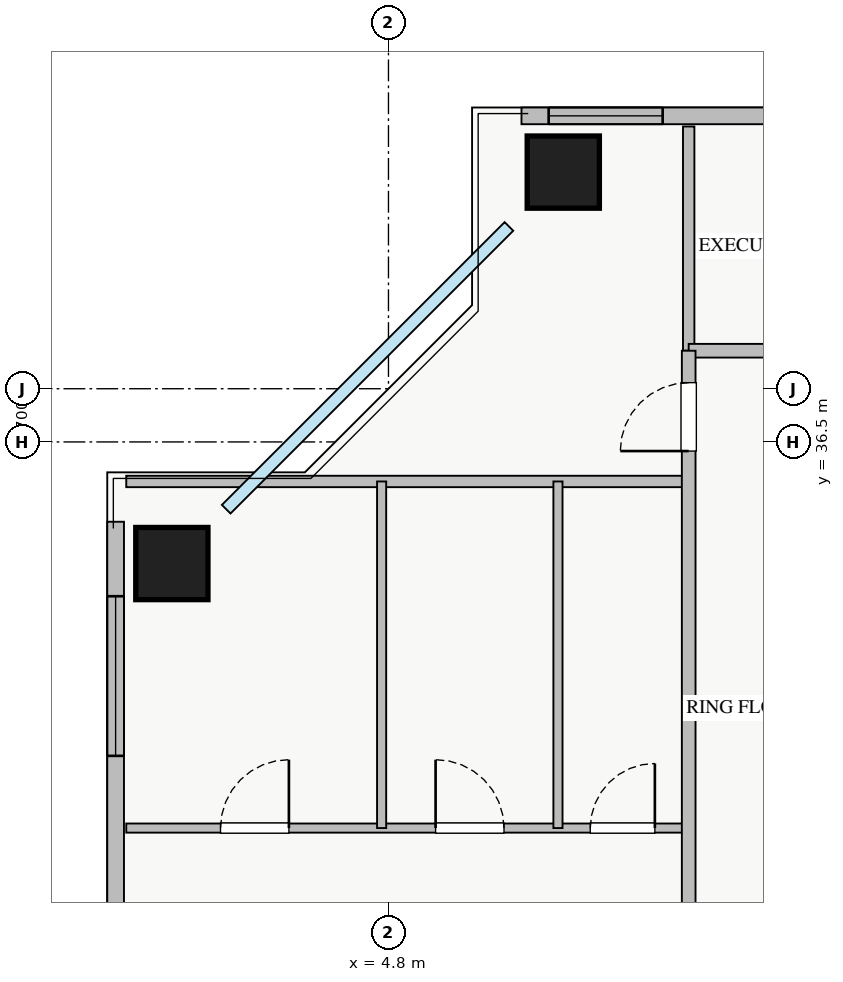
"""IFC4 building model, lengths in metres.
Left out: names, types, materials, properties, quantities, classifications, styles, units other than length and angle.
Written with IfcOpenShell. Run it as: python <this file> out.ifc"""

import sys

from ifc_helpers import new_model, si_unit, direction, frame, frame_2d, origin, origin_2d, place, context, subcontext, project, spatial, rectangle, extrude, source, transform, mapped, element, fill, save


model = new_model("IFC4")
c1 = context("Model", 3, precision=1e-05, world=origin(), true_north=direction((0.0, 1.0)))
c2 = subcontext(c1, "Body", "Model", "MODEL_VIEW")
j1 = project(units=[si_unit("LENGTHUNIT", "METRE"), si_unit("PLANEANGLEUNIT", "RADIAN")], contexts=[c1])
p1 = place(None, origin())
s1 = spatial("IfcSite", under=j1, at=p1, CompositionType="ELEMENT")
p2 = place(p1, origin())
s2 = spatial("IfcBuilding", under=s1, at=p2, CompositionType="ELEMENT")
p3 = place(p2, frame((0.0, 0.0, 150.25)))
s3 = spatial("IfcBuildingStorey", under=s2, at=p3, CompositionType="ELEMENT", Elevation=150.25)
m1 = source(origin(), c2, "Body", "SweptSolid", [
    extrude(rectangle(XDim=0.95, YDim=0.95, at=origin_2d()), origin(), (0.0, 0.0, 1.0), 3.25),
])
for number, where, z_axis, x_axis in (
    (1, (7.1, 40.05, 0.0), (0.0, 0.0, 1.0), (1.0, 0.0, 0.0)),
    (2, (1.95, 34.9, 0.0), (0.0, 0.0, 1.0), (1.0, 0.0, 0.0)),
):
    element("IfcColumn", number, at=place(p3, frame(where, z_axis=z_axis, x_axis=x_axis)), inside=s3, PredefinedType="COLUMN", context=c2, shape_type="MappedRepresentation", body=[
        mapped(m1, transform((0.0, 0.0, 0.0), x_axis=(1.0, 0.0, 0.0), y_axis=(0.0, 1.0, 0.0), z_axis=(0.0, 0.0, 1.0), scale=1.0)),
    ])
p4 = place(p3, frame((6.55, 40.79, 0.0), z_axis=(0.0, 0.0, 1.0), x_axis=(1.0, 0.0, 0.0)))
e3 = element("IfcWall", 3, at=p4, inside=s3, PredefinedType="STANDARD", context=c2, shape_type="SweptSolid", body=[
    extrude(rectangle(XDim=24.9, YDim=0.22, at=frame_2d((12.45, 0.0))), origin(), (0.0, 0.0, 1.0), 2.61),
])
p5 = place(p4, frame((13.3, 0.0, 0.0)))
e4 = element("IfcOpeningElement", 4, at=p5, cuts=e3, PredefinedType="OPENING", context=c2, shape_type="SweptSolid", body=[
    extrude(rectangle(XDim=1.2, YDim=2.1, at=frame_2d((0.6, 1.05))), frame((0.0, 0.12, 0.0), z_axis=(0.0, -1.0, 0.0), x_axis=(1.0, 0.0, 0.0)), (0.0, 0.0, 1.0), 0.24),
])
p6 = place(p4, frame((0.357, 0.0, 0.9)))
e5 = element("IfcOpeningElement", 5, at=p6, cuts=e3, PredefinedType="OPENING", context=c2, shape_type="SweptSolid", body=[
    extrude(rectangle(XDim=1.5, YDim=1.5, at=frame_2d((0.75, 0.75))), frame((0.0, 0.12, 0.0), z_axis=(0.0, -1.0, 0.0), x_axis=(1.0, 0.0, 0.0)), (0.0, 0.0, 1.0), 0.24),
])
p7 = place(p4, frame((9.77, 0.0, 0.9)))
e6 = element("IfcOpeningElement", 6, at=p7, cuts=e3, PredefinedType="OPENING", context=c2, shape_type="SweptSolid", body=[
    extrude(rectangle(XDim=1.8, YDim=1.5, at=frame_2d((0.9, 0.75))), frame((0.0, 0.12, 0.0), z_axis=(0.0, -1.0, 0.0), x_axis=(1.0, 0.0, 0.0)), (0.0, 0.0, 1.0), 0.24),
])
p8 = place(p4, frame((14.813, 0.0, 0.9)))
e7 = element("IfcOpeningElement", 7, at=p8, cuts=e3, PredefinedType="OPENING", context=c2, shape_type="SweptSolid", body=[
    extrude(rectangle(XDim=1.5, YDim=1.45, at=frame_2d((0.75, 0.725))), frame((0.0, 0.12, 0.0), z_axis=(0.0, -1.0, 0.0), x_axis=(1.0, 0.0, 0.0)), (0.0, 0.0, 1.0), 0.24),
])
p9 = place(p4, frame((20.738, 0.0, 0.9)))
e8 = element("IfcOpeningElement", 8, at=p9, cuts=e3, PredefinedType="OPENING", context=c2, shape_type="SweptSolid", body=[
    extrude(rectangle(XDim=2.1, YDim=1.48, at=frame_2d((1.05, 0.74))), frame((0.0, 0.12, 0.0), z_axis=(0.0, -1.0, 0.0), x_axis=(1.0, 0.0, 0.0)), (0.0, 0.0, 1.0), 0.24),
])
p10 = place(p4, frame((4.136, 0.0, 0.9)))
e9 = element("IfcOpeningElement", 9, at=p10, cuts=e3, PredefinedType="OPENING", context=c2, shape_type="SweptSolid", body=[
    extrude(rectangle(XDim=2.4, YDim=1.5, at=frame_2d((1.2, 0.75))), frame((0.0, 0.12, 0.0), z_axis=(0.0, -1.0, 0.0), x_axis=(1.0, 0.0, 0.0)), (0.0, 0.0, 1.0), 0.24),
])
p11 = place(p3, frame((1.21, 10.55, 0.0), z_axis=(0.0, 0.0, 1.0), x_axis=(0.0, 1.0, 0.0)))
e10 = element("IfcWall", 10, at=p11, inside=s3, PredefinedType="STANDARD", context=c2, shape_type="SweptSolid", body=[
    extrude(rectangle(XDim=24.9, YDim=0.22, at=frame_2d((12.45, 0.0))), origin(), (0.0, 0.0, 1.0), 2.61),
])
p12 = place(p11, frame((13.3, 0.0, 0.0)))
e11 = element("IfcOpeningElement", 11, at=p12, cuts=e10, PredefinedType="OPENING", context=c2, shape_type="SweptSolid", body=[
    extrude(rectangle(XDim=1.2, YDim=2.1, at=frame_2d((0.6, 1.05))), frame((0.0, 0.12, 0.0), z_axis=(0.0, -1.0, 0.0), x_axis=(1.0, 0.0, 0.0)), (0.0, 0.0, 1.0), 0.24),
])
p13 = place(p11, frame((1.912, 0.0, 0.9)))
e12 = element("IfcOpeningElement", 12, at=p13, cuts=e10, PredefinedType="OPENING", context=c2, shape_type="SweptSolid", body=[
    extrude(rectangle(XDim=2.4, YDim=1.48, at=frame_2d((1.2, 0.74))), frame((0.0, 0.12, 0.0), z_axis=(0.0, -1.0, 0.0), x_axis=(1.0, 0.0, 0.0)), (0.0, 0.0, 1.0), 0.24),
])
p14 = place(p11, frame((21.82, 0.0, 0.9)))
e13 = element("IfcOpeningElement", 13, at=p14, cuts=e10, PredefinedType="OPENING", context=c2, shape_type="SweptSolid", body=[
    extrude(rectangle(XDim=2.1, YDim=1.5, at=frame_2d((1.05, 0.75))), frame((0.0, 0.12, 0.0), z_axis=(0.0, -1.0, 0.0), x_axis=(1.0, 0.0, 0.0)), (0.0, 0.0, 1.0), 0.24),
])
p15 = place(p11, frame((12.05, 0.0, 0.9)))
e14 = element("IfcOpeningElement", 14, at=p15, cuts=e10, PredefinedType="OPENING", context=c2, shape_type="SweptSolid", body=[
    extrude(rectangle(XDim=0.9, YDim=1.2, at=frame_2d((0.45, 0.6))), frame((0.0, 0.12, 0.0), z_axis=(0.0, -1.0, 0.0), x_axis=(1.0, 0.0, 0.0)), (0.0, 0.0, 1.0), 0.24),
])
p16 = place(p11, frame((7.615, 0.0, 0.9)))
e15 = element("IfcOpeningElement", 15, at=p16, cuts=e10, PredefinedType="OPENING", context=c2, shape_type="SweptSolid", body=[
    extrude(rectangle(XDim=0.9, YDim=1.2, at=frame_2d((0.45, 0.6))), frame((0.0, 0.12, 0.0), z_axis=(0.0, -1.0, 0.0), x_axis=(1.0, 0.0, 0.0)), (0.0, 0.0, 1.0), 0.24),
])
p17 = place(p11, frame((16.895, 0.0, 0.9)))
e16 = element("IfcOpeningElement", 16, at=p17, cuts=e10, PredefinedType="OPENING", context=c2, shape_type="SweptSolid", body=[
    extrude(rectangle(XDim=0.9, YDim=1.2, at=frame_2d((0.45, 0.6))), frame((0.0, 0.12, 0.0), z_axis=(0.0, -1.0, 0.0), x_axis=(1.0, 0.0, 0.0)), (0.0, 0.0, 1.0), 0.24),
])
p18 = place(p3, frame((8.75, 37.7, 0.0), z_axis=(0.0, 0.0, 1.0), x_axis=(0.0, 1.0, 0.0)))
e17 = element("IfcWall", 17, at=p18, inside=s3, PredefinedType="PARTITIONING", context=c2, shape_type="SweptSolid", body=[
    extrude(rectangle(XDim=2.95, YDim=0.15, at=frame_2d((1.475, 0.0))), origin(), (0.0, 0.0, 1.0), 3.07),
])
p19 = place(p3, frame((8.75, 37.7, 0.0), z_axis=(0.0, 0.0, 1.0), x_axis=(1.0, 0.0, 0.0)))
e18 = element("IfcWall", 18, at=p19, inside=s3, PredefinedType="PARTITIONING", context=c2, shape_type="SweptSolid", body=[
    extrude(rectangle(XDim=23.61, YDim=0.18, at=frame_2d((11.805, 0.0))), origin(), (0.0, 0.0, 1.0), 3.07),
])
p20 = place(p19, frame((2.795, 0.0, 0.0)))
e19 = element("IfcOpeningElement", 19, at=p20, cuts=e18, PredefinedType="OPENING", context=c2, shape_type="SweptSolid", body=[
    extrude(rectangle(XDim=1.0, YDim=2.05, at=frame_2d((0.5, 1.025))), frame((0.0, 0.1, 0.0), z_axis=(0.0, -1.0, 0.0), x_axis=(1.0, 0.0, 0.0)), (0.0, 0.0, 1.0), 0.2),
])
p21 = place(p19, frame((7.97, 0.0, 0.0)))
e20 = element("IfcOpeningElement", 20, at=p21, cuts=e18, PredefinedType="OPENING", context=c2, shape_type="SweptSolid", body=[
    extrude(rectangle(XDim=1.0, YDim=2.05, at=frame_2d((0.5, 1.025))), frame((0.0, 0.1, 0.0), z_axis=(0.0, -1.0, 0.0), x_axis=(1.0, 0.0, 0.0)), (0.0, 0.0, 1.0), 0.2),
])
p22 = place(p19, frame((13.385, 0.0, 0.0)))
e21 = element("IfcOpeningElement", 21, at=p22, cuts=e18, PredefinedType="OPENING", context=c2, shape_type="SweptSolid", body=[
    extrude(rectangle(XDim=1.0, YDim=2.05, at=frame_2d((0.5, 1.025))), frame((0.0, 0.1, 0.0), z_axis=(0.0, -1.0, 0.0), x_axis=(1.0, 0.0, 0.0)), (0.0, 0.0, 1.0), 0.2),
])
p23 = place(p19, frame((19.825, 0.0, 0.0)))
e22 = element("IfcOpeningElement", 22, at=p23, cuts=e18, PredefinedType="OPENING", context=c2, shape_type="SweptSolid", body=[
    extrude(rectangle(XDim=1.0, YDim=2.05, at=frame_2d((0.5, 1.025))), frame((0.0, 0.1, 0.0), z_axis=(0.0, -1.0, 0.0), x_axis=(1.0, 0.0, 0.0)), (0.0, 0.0, 1.0), 0.2),
])
p24 = place(p3, frame((1.35, 35.98, 0.0), z_axis=(0.0, 0.0, 1.0), x_axis=(1.0, 0.0, 0.0)))
e23 = element("IfcWall", 23, at=p24, inside=s3, PredefinedType="PARTITIONING", context=c2, shape_type="SweptSolid", body=[
    extrude(rectangle(XDim=7.4, YDim=0.15, at=frame_2d((3.7, 0.0))), origin(), (0.0, 0.0, 1.0), 3.07),
])
p25 = place(p3, frame((1.35, 31.42, 0.0), z_axis=(0.0, 0.0, 1.0), x_axis=(1.0, 0.0, 0.0)))
e24 = element("IfcWall", 24, at=p25, inside=s3, PredefinedType="PLUMBINGWALL", context=c2, shape_type="SweptSolid", body=[
    extrude(rectangle(XDim=7.4, YDim=0.12, at=frame_2d((3.7, 0.0))), origin(), (0.0, 0.0, 1.0), 3.07),
])
p26 = place(p25, frame((1.24, 0.0, 0.0)))
e25 = element("IfcOpeningElement", 25, at=p26, cuts=e24, PredefinedType="OPENING", context=c2, shape_type="SweptSolid", body=[
    extrude(rectangle(XDim=0.9, YDim=2.05, at=frame_2d((0.45, 1.025))), frame((0.0, 0.07, 0.0), z_axis=(0.0, -1.0, 0.0), x_axis=(1.0, 0.0, 0.0)), (0.0, 0.0, 1.0), 0.14),
])
p27 = place(p25, frame((4.07, 0.0, 0.0)))
e26 = element("IfcOpeningElement", 26, at=p27, cuts=e24, PredefinedType="OPENING", context=c2, shape_type="SweptSolid", body=[
    extrude(rectangle(XDim=0.9, YDim=2.05, at=frame_2d((0.45, 1.025))), frame((0.0, 0.07, 0.0), z_axis=(0.0, -1.0, 0.0), x_axis=(1.0, 0.0, 0.0)), (0.0, 0.0, 1.0), 0.14),
])
p28 = place(p25, frame((6.105, 0.0, 0.0)))
e27 = element("IfcOpeningElement", 27, at=p28, cuts=e24, PredefinedType="OPENING", context=c2, shape_type="SweptSolid", body=[
    extrude(rectangle(XDim=0.85, YDim=2.05, at=frame_2d((0.425, 1.025))), frame((0.0, 0.07, 0.0), z_axis=(0.0, -1.0, 0.0), x_axis=(1.0, 0.0, 0.0)), (0.0, 0.0, 1.0), 0.14),
])
p29 = place(p3, frame((4.71, 31.42, 0.0), z_axis=(0.0, 0.0, 1.0), x_axis=(0.0, 1.0, 0.0)))
e28 = element("IfcWall", 28, at=p29, inside=s3, PredefinedType="PLUMBINGWALL", context=c2, shape_type="SweptSolid", body=[
    extrude(rectangle(XDim=4.56, YDim=0.12, at=frame_2d((2.28, 0.0))), origin(), (0.0, 0.0, 1.0), 3.07),
])
p30 = place(p3, frame((7.03, 31.42, 0.0), z_axis=(0.0, 0.0, 1.0), x_axis=(0.0, 1.0, 0.0)))
e29 = element("IfcWall", 29, at=p30, inside=s3, PredefinedType="PLUMBINGWALL", context=c2, shape_type="SweptSolid", body=[
    extrude(rectangle(XDim=4.56, YDim=0.12, at=frame_2d((2.28, 0.0))), origin(), (0.0, 0.0, 1.0), 2.577),
])
p31 = place(p3, frame((8.75, 8.3, 0.0), z_axis=(0.0, 0.0, 1.0), x_axis=(0.0, 1.0, 0.0)))
e30 = element("IfcWall", 30, at=p31, inside=s3, PredefinedType="PARTITIONING", context=c2, shape_type="SweptSolid", body=[
    extrude(rectangle(XDim=29.4, YDim=0.18, at=frame_2d((14.7, 0.0))), origin(), (0.0, 0.0, 1.0), 3.07),
])
p32 = place(p31, frame((28.08, 0.0, 0.0)))
e31 = element("IfcOpeningElement", 31, at=p32, cuts=e30, PredefinedType="OPENING", context=c2, shape_type="SweptSolid", body=[
    extrude(rectangle(XDim=0.9, YDim=2.05, at=frame_2d((0.45, 1.025))), frame((0.0, 0.1, 0.0), z_axis=(0.0, -1.0, 0.0), x_axis=(1.0, 0.0, 0.0)), (0.0, 0.0, 1.0), 0.2),
])
p33 = place(p31, frame((0.245, 0.0, 0.0)))
e32 = element("IfcOpeningElement", 32, at=p33, cuts=e30, PredefinedType="OPENING", context=c2, shape_type="SweptSolid", body=[
    extrude(rectangle(XDim=0.9, YDim=2.05, at=frame_2d((0.45, 1.025))), frame((0.0, 0.1, 0.0), z_axis=(0.0, -1.0, 0.0), x_axis=(1.0, 0.0, 0.0)), (0.0, 0.0, 1.0), 0.2),
])
p34 = place(p31, frame((5.0, 0.0, 0.0)))
e33 = element("IfcOpeningElement", 33, at=p34, cuts=e30, PredefinedType="OPENING", context=c2, shape_type="SweptSolid", body=[
    extrude(rectangle(XDim=1.0, YDim=2.05, at=frame_2d((0.5, 1.025))), frame((0.0, 0.1, 0.0), z_axis=(0.0, -1.0, 0.0), x_axis=(1.0, 0.0, 0.0)), (0.0, 0.0, 1.0), 0.2),
])
p35 = place(p31, frame((11.165, 0.0, 0.0)))
e34 = element("IfcOpeningElement", 34, at=p35, cuts=e30, PredefinedType="OPENING", context=c2, shape_type="SweptSolid", body=[
    extrude(rectangle(XDim=1.0, YDim=2.05, at=frame_2d((0.5, 1.025))), frame((0.0, 0.1, 0.0), z_axis=(0.0, -1.0, 0.0), x_axis=(1.0, 0.0, 0.0)), (0.0, 0.0, 1.0), 0.2),
])
p36 = place(p31, frame((20.325, 0.0, 0.0)))
e35 = element("IfcOpeningElement", 35, at=p36, cuts=e30, PredefinedType="OPENING", context=c2, shape_type="SweptSolid", body=[
    extrude(rectangle(XDim=1.0, YDim=2.05, at=frame_2d((0.5, 1.025))), frame((0.0, 0.1, 0.0), z_axis=(0.0, -1.0, 0.0), x_axis=(1.0, 0.0, 0.0)), (0.0, 0.0, 1.0), 0.2),
])
m2 = source(origin(), c2, "Body", "SweptSolid", [
    extrude(rectangle(XDim=1.5, YDim=1.5, at=frame_2d((0.75, 0.75))), frame((0.0, 0.03, 0.0), z_axis=(0.0, -1.0, 0.0), x_axis=(1.0, 0.0, 0.0)), (0.0, 0.0, 1.0), 0.06),
])
p37 = place(p6, origin())
e36 = element("IfcWindow", 36, at=p37, inside=s3, PartitioningType="TRIPLE_PANEL_VERTICAL", PredefinedType="WINDOW", context=c2, shape_type="MappedRepresentation", body=[
    mapped(m2, transform((0.0, 0.0, 0.0), x_axis=(1.0, 0.0, 0.0), y_axis=(0.0, 1.0, 0.0), z_axis=(0.0, 0.0, 1.0), scale=1.0)),
])
fill(e5, e36)
m3 = source(origin(), c2, "Body", "SweptSolid", [
    extrude(rectangle(XDim=2.1, YDim=1.5, at=frame_2d((1.05, 0.75))), frame((0.0, 0.03, 0.0), z_axis=(0.0, -1.0, 0.0), x_axis=(1.0, 0.0, 0.0)), (0.0, 0.0, 1.0), 0.06),
])
p38 = place(p14, origin())
e37 = element("IfcWindow", 37, at=p38, inside=s3, PartitioningType="TRIPLE_PANEL_VERTICAL", PredefinedType="WINDOW", context=c2, shape_type="MappedRepresentation", body=[
    mapped(m3, transform((0.0, 0.0, 0.0), x_axis=(1.0, 0.0, 0.0), y_axis=(0.0, 1.0, 0.0), z_axis=(0.0, 0.0, 1.0), scale=1.0)),
])
fill(e13, e37)
m4 = source(origin(), c2, "Body", "SweptSolid", [
    extrude(rectangle(XDim=0.9, YDim=2.05, at=frame_2d((0.45, 1.025))), frame((0.0, 0.025, 0.0), z_axis=(0.0, -1.0, 0.0), x_axis=(1.0, 0.0, 0.0)), (0.0, 0.0, 1.0), 0.05),
])
p39 = place(p26, origin())
e38 = element("IfcDoor", 38, at=p39, inside=s3, OperationType="SINGLE_SWING_RIGHT", PredefinedType="DOOR", context=c2, shape_type="MappedRepresentation", body=[
    mapped(m4, transform((0.0, 0.0, 0.0), x_axis=(1.0, 0.0, 0.0), y_axis=(0.0, 1.0, 0.0), z_axis=(0.0, 0.0, 1.0), scale=1.0)),
])
fill(e25, e38)
p40 = place(p27, origin())
e39 = element("IfcDoor", 39, at=p40, inside=s3, OperationType="SINGLE_SWING_LEFT", PredefinedType="DOOR", context=c2, shape_type="MappedRepresentation", body=[
    mapped(m4, transform((0.0, 0.0, 0.0), x_axis=(1.0, 0.0, 0.0), y_axis=(0.0, 1.0, 0.0), z_axis=(0.0, 0.0, 1.0), scale=1.0)),
])
fill(e26, e39)
m5 = source(origin(), c2, "Body", "SweptSolid", [
    extrude(rectangle(XDim=0.85, YDim=2.05, at=frame_2d((0.425, 1.025))), frame((0.0, 0.025, 0.0), z_axis=(0.0, -1.0, 0.0), x_axis=(1.0, 0.0, 0.0)), (0.0, 0.0, 1.0), 0.05),
])
p41 = place(p28, origin())
e40 = element("IfcDoor", 40, at=p41, inside=s3, OperationType="SINGLE_SWING_RIGHT", PredefinedType="DOOR", context=c2, shape_type="MappedRepresentation", body=[
    mapped(m5, transform((0.0, 0.0, 0.0), x_axis=(1.0, 0.0, 0.0), y_axis=(0.0, 1.0, 0.0), z_axis=(0.0, 0.0, 1.0), scale=1.0)),
])
fill(e27, e40)
p42 = place(p32, origin())
e41 = element("IfcDoor", 41, at=p42, inside=s3, OperationType="SINGLE_SWING_LEFT", PredefinedType="DOOR", context=c2, shape_type="MappedRepresentation", body=[
    mapped(m4, transform((0.0, 0.0, 0.0), x_axis=(1.0, 0.0, 0.0), y_axis=(0.0, 1.0, 0.0), z_axis=(0.0, 0.0, 1.0), scale=1.0)),
])
fill(e31, e41)
save(model, sys.argv[1])
